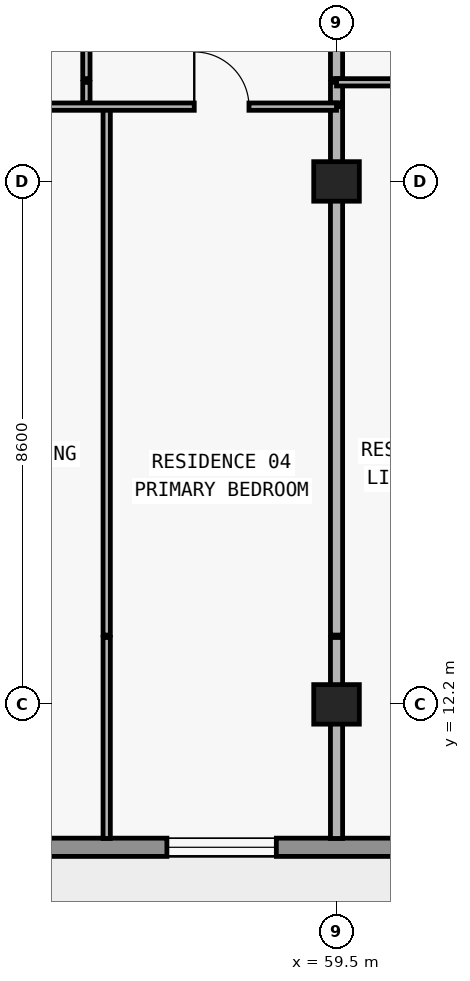
"""IFC4 building model, lengths in metres.
Left out: names, types, materials, properties, quantities, classifications, styles, units other than length and angle.
Written with IfcOpenShell. Run it as: python <this file> out.ifc"""

import sys

from ifc_helpers import new_model, si_unit, direction, frame, frame_2d, origin, origin_2d, place, context, subcontext, project, spatial, rectangle, extrude, element, fill, save


model = new_model("IFC4")
c1 = context("Model", 3, precision=1e-05, world=origin(), true_north=direction((0.0, 1.0)))
c2 = subcontext(c1, "Body", "Model", "MODEL_VIEW")
j1 = project(units=[si_unit("LENGTHUNIT", "METRE"), si_unit("PLANEANGLEUNIT", "RADIAN")], contexts=[c1])
p1 = place(None, origin())
s1 = spatial("IfcSite", under=j1, at=p1, CompositionType="ELEMENT")
p2 = place(p1, origin())
s2 = spatial("IfcBuilding", under=s1, at=p2, CompositionType="ELEMENT")
p3 = place(p2, frame((0.0, 0.0, 246.3)))
s3 = spatial("IfcBuildingStorey", under=s2, at=p3, CompositionType="ELEMENT", Elevation=246.3)
for number, where, z_axis, x_axis in (
    (1, (59.5, 12.2, 0.0), (0.0, 0.0, 1.0), (1.0, 0.0, 0.0)),
    (2, (59.5, 20.8, 0.0), (0.0, 0.0, 1.0), (1.0, 0.0, 0.0)),
):
    element("IfcColumn", number, at=place(p3, frame(where, z_axis=z_axis, x_axis=x_axis)), inside=s3, PredefinedType="COLUMN", context=c2, shape_type="SweptSolid", body=[
        extrude(rectangle(XDim=0.75, YDim=0.65, at=origin_2d()), origin(), (0.0, 0.0, 1.0), 3.05),
    ])
p4 = place(p3, frame((65.7, 9.85, 0.0), z_axis=(0.0, 0.0, 1.0), x_axis=(-1.0, 0.0, 0.0)))
e3 = element("IfcWall", 3, at=p4, inside=s3, PredefinedType="STANDARD", context=c2, shape_type="SweptSolid", body=[
    extrude(rectangle(XDim=53.6, YDim=0.3, at=frame_2d((26.8, 0.0))), origin(), (0.0, 0.0, 1.0), 3.05),
])
p5 = place(p4, frame((48.05, 0.0, 0.85)))
e4 = element("IfcOpeningElement", 4, at=p5, cuts=e3, PredefinedType="OPENING", context=c2, shape_type="SweptSolid", body=[
    extrude(rectangle(XDim=1.8, YDim=1.55, at=frame_2d((0.9, 0.775))), frame((0.0, 0.16, 0.0), z_axis=(0.0, -1.0, 0.0), x_axis=(1.0, 0.0, 0.0)), (0.0, 0.0, 1.0), 0.32),
])
p6 = place(p4, frame((44.09, 0.0, 0.0)))
e5 = element("IfcOpeningElement", 5, at=p6, cuts=e3, PredefinedType="OPENING", context=c2, shape_type="SweptSolid", body=[
    extrude(rectangle(XDim=2.0, YDim=2.3, at=frame_2d((1.0, 1.15))), frame((0.0, 0.16, 0.0), z_axis=(0.0, -1.0, 0.0), x_axis=(1.0, 0.0, 0.0)), (0.0, 0.0, 1.0), 0.32),
])
p7 = place(p4, frame((39.99, 0.0, 0.85)))
e6 = element("IfcOpeningElement", 6, at=p7, cuts=e3, PredefinedType="OPENING", context=c2, shape_type="SweptSolid", body=[
    extrude(rectangle(XDim=1.8, YDim=1.55, at=frame_2d((0.9, 0.775))), frame((0.0, 0.16, 0.0), z_axis=(0.0, -1.0, 0.0), x_axis=(1.0, 0.0, 0.0)), (0.0, 0.0, 1.0), 0.32),
])
p8 = place(p4, frame((36.09, 0.0, 0.0)))
e7 = element("IfcOpeningElement", 7, at=p8, cuts=e3, PredefinedType="OPENING", context=c2, shape_type="SweptSolid", body=[
    extrude(rectangle(XDim=2.0, YDim=2.3, at=frame_2d((1.0, 1.15))), frame((0.0, 0.16, 0.0), z_axis=(0.0, -1.0, 0.0), x_axis=(1.0, 0.0, 0.0)), (0.0, 0.0, 1.0), 0.32),
])
p9 = place(p4, frame((31.41, 0.0, 0.65)))
e8 = element("IfcOpeningElement", 8, at=p9, cuts=e3, PredefinedType="OPENING", context=c2, shape_type="SweptSolid", body=[
    extrude(rectangle(XDim=2.6, YDim=1.85, at=frame_2d((1.3, 0.925))), frame((0.0, 0.16, 0.0), z_axis=(0.0, -1.0, 0.0), x_axis=(1.0, 0.0, 0.0)), (0.0, 0.0, 1.0), 0.32),
])
p10 = place(p4, frame((25.7, 0.0, 0.85)))
e9 = element("IfcOpeningElement", 9, at=p10, cuts=e3, PredefinedType="OPENING", context=c2, shape_type="SweptSolid", body=[
    extrude(rectangle(XDim=2.2, YDim=1.55, at=frame_2d((1.1, 0.775))), frame((0.0, 0.16, 0.0), z_axis=(0.0, -1.0, 0.0), x_axis=(1.0, 0.0, 0.0)), (0.0, 0.0, 1.0), 0.32),
])
p11 = place(p4, frame((17.7, 0.0, 0.85)))
e10 = element("IfcOpeningElement", 10, at=p11, cuts=e3, PredefinedType="OPENING", context=c2, shape_type="SweptSolid", body=[
    extrude(rectangle(XDim=2.2, YDim=1.55, at=frame_2d((1.1, 0.775))), frame((0.0, 0.16, 0.0), z_axis=(0.0, -1.0, 0.0), x_axis=(1.0, 0.0, 0.0)), (0.0, 0.0, 1.0), 0.32),
])
p12 = place(p4, frame((11.29, 0.0, 0.0)))
e11 = element("IfcOpeningElement", 11, at=p12, cuts=e3, PredefinedType="OPENING", context=c2, shape_type="SweptSolid", body=[
    extrude(rectangle(XDim=2.0, YDim=2.3, at=frame_2d((1.0, 1.15))), frame((0.0, 0.16, 0.0), z_axis=(0.0, -1.0, 0.0), x_axis=(1.0, 0.0, 0.0)), (0.0, 0.0, 1.0), 0.32),
])
p13 = place(p4, frame((7.19, 0.0, 0.85)))
e12 = element("IfcOpeningElement", 12, at=p13, cuts=e3, PredefinedType="OPENING", context=c2, shape_type="SweptSolid", body=[
    extrude(rectangle(XDim=1.8, YDim=1.55, at=frame_2d((0.9, 0.775))), frame((0.0, 0.16, 0.0), z_axis=(0.0, -1.0, 0.0), x_axis=(1.0, 0.0, 0.0)), (0.0, 0.0, 1.0), 0.32),
])
p14 = place(p4, frame((0.65, 0.0, 0.85)))
e13 = element("IfcOpeningElement", 13, at=p14, cuts=e3, PredefinedType="OPENING", context=c2, shape_type="SweptSolid", body=[
    extrude(rectangle(XDim=1.8, YDim=1.55, at=frame_2d((0.9, 0.775))), frame((0.0, 0.16, 0.0), z_axis=(0.0, -1.0, 0.0), x_axis=(1.0, 0.0, 0.0)), (0.0, 0.0, 1.0), 0.32),
])
p15 = place(p3, frame((55.386, 22.09, 0.0), z_axis=(0.0, 0.0, 1.0), x_axis=(0.0, 1.0, 0.0)))
e14 = element("IfcWall", 14, at=p15, inside=s3, PredefinedType="PARTITIONING", context=c2, shape_type="SweptSolid", body=[
    extrude(rectangle(XDim=0.34, YDim=0.12, at=frame_2d((0.17, 0.0))), origin(), (0.0, 0.0, 1.0), 2.578),
])
p16 = place(p3, frame((55.386, 22.49, 0.0), z_axis=(0.0, 0.0, 1.0), x_axis=(0.0, 1.0, 0.0)))
e15 = element("IfcWall", 15, at=p16, inside=s3, PredefinedType="PARTITIONING", context=c2, shape_type="SweptSolid", body=[
    extrude(rectangle(XDim=4.69, YDim=0.12, at=frame_2d((2.345, 0.0))), origin(), (0.0, 0.0, 1.0), 2.578),
])
p17 = place(p16, frame((1.895, 0.0, 0.0)))
e16 = element("IfcOpeningElement", 16, at=p17, cuts=e15, PredefinedType="OPENING", context=c2, shape_type="SweptSolid", body=[
    extrude(rectangle(XDim=0.9, YDim=2.15, at=frame_2d((0.45, 1.075))), frame((0.0, 0.07, 0.0), z_axis=(0.0, -1.0, 0.0), x_axis=(1.0, 0.0, 0.0)), (0.0, 0.0, 1.0), 0.14),
])
p18 = place(p3, frame((55.72, 9.995, 0.0), z_axis=(0.0, 0.0, 1.0), x_axis=(0.0, 1.0, 0.0)))
e17 = element("IfcWall", 17, at=p18, inside=s3, PredefinedType="PARTITIONING", context=c2, shape_type="SweptSolid", body=[
    extrude(rectangle(XDim=3.305, YDim=0.12, at=frame_2d((1.652, 0.0))), origin(), (0.0, 0.0, 1.0), 3.05),
])
p19 = place(p3, frame((55.72, 13.34, 0.0), z_axis=(0.0, 0.0, 1.0), x_axis=(0.0, 1.0, 0.0)))
e18 = element("IfcWall", 18, at=p19, inside=s3, PredefinedType="PARTITIONING", context=c2, shape_type="SweptSolid", body=[
    extrude(rectangle(XDim=8.69, YDim=0.12, at=frame_2d((4.345, 0.0))), origin(), (0.0, 0.0, 1.0), 3.05),
])
p20 = place(p3, frame((59.5, 9.995, 0.0), z_axis=(0.0, 0.0, 1.0), x_axis=(0.0, 1.0, 0.0)))
e19 = element("IfcWall", 19, at=p20, inside=s3, PredefinedType="PARTITIONING", context=c2, shape_type="SweptSolid", body=[
    extrude(rectangle(XDim=3.305, YDim=0.2, at=frame_2d((1.652, 0.0))), origin(), (0.0, 0.0, 1.0), 2.263),
])
p21 = place(p3, frame((59.5, 13.34, 0.0), z_axis=(0.0, 0.0, 1.0), x_axis=(0.0, 1.0, 0.0)))
e20 = element("IfcWall", 20, at=p21, inside=s3, PredefinedType="PARTITIONING", context=c2, shape_type="SweptSolid", body=[
    extrude(rectangle(XDim=8.69, YDim=0.2, at=frame_2d((4.345, 0.0))), origin(), (0.0, 0.0, 1.0), 2.263),
])
p22 = place(p3, frame((59.5, 22.09, 0.0), z_axis=(0.0, 0.0, 1.0), x_axis=(0.0, 1.0, 0.0)))
e21 = element("IfcWall", 21, at=p22, inside=s3, PredefinedType="PARTITIONING", context=c2, shape_type="SweptSolid", body=[
    extrude(rectangle(XDim=0.34, YDim=0.2, at=frame_2d((0.17, 0.0))), origin(), (0.0, 0.0, 1.0), 2.263),
])
p23 = place(p3, frame((59.5, 22.49, 0.0), z_axis=(0.0, 0.0, 1.0), x_axis=(0.0, 1.0, 0.0)))
e22 = element("IfcWall", 22, at=p23, inside=s3, PredefinedType="PARTITIONING", context=c2, shape_type="SweptSolid", body=[
    extrude(rectangle(XDim=4.69, YDim=0.2, at=frame_2d((2.345, 0.0))), origin(), (0.0, 0.0, 1.0), 2.263),
])
p24 = place(p3, frame((51.32, 22.03, 0.0), z_axis=(0.0, 0.0, 1.0), x_axis=(1.0, 0.0, 0.0)))
e23 = element("IfcWall", 23, at=p24, inside=s3, PredefinedType="PARTITIONING", context=c2, shape_type="SweptSolid", body=[
    extrude(rectangle(XDim=8.18, YDim=0.12, at=frame_2d((4.09, 0.0))), origin(), (0.0, 0.0, 1.0), 3.05),
])
p25 = place(p24, frame((1.583, 0.0, 0.0)))
e24 = element("IfcOpeningElement", 24, at=p25, cuts=e23, PredefinedType="OPENING", context=c2, shape_type="SweptSolid", body=[
    extrude(rectangle(XDim=0.9, YDim=2.15, at=frame_2d((0.45, 1.075))), frame((0.0, 0.07, 0.0), z_axis=(0.0, -1.0, 0.0), x_axis=(1.0, 0.0, 0.0)), (0.0, 0.0, 1.0), 0.14),
])
p26 = place(p24, frame((5.84, 0.0, 0.0)))
e25 = element("IfcOpeningElement", 25, at=p26, cuts=e23, PredefinedType="OPENING", context=c2, shape_type="SweptSolid", body=[
    extrude(rectangle(XDim=0.9, YDim=2.15, at=frame_2d((0.45, 1.075))), frame((0.0, 0.07, 0.0), z_axis=(0.0, -1.0, 0.0), x_axis=(1.0, 0.0, 0.0)), (0.0, 0.0, 1.0), 0.14),
])
p27 = place(p3, frame((59.5, 22.43, 0.0), z_axis=(0.0, 0.0, 1.0), x_axis=(1.0, 0.0, 0.0)))
e26 = element("IfcWall", 26, at=p27, inside=s3, PredefinedType="PARTITIONING", context=c2, shape_type="SweptSolid", body=[
    extrude(rectangle(XDim=6.2, YDim=0.12, at=frame_2d((3.1, 0.0))), origin(), (0.0, 0.0, 1.0), 3.05),
])
p28 = place(p27, frame((1.1, 0.0, 0.0)))
e27 = element("IfcOpeningElement", 27, at=p28, cuts=e26, PredefinedType="OPENING", context=c2, shape_type="SweptSolid", body=[
    extrude(rectangle(XDim=0.9, YDim=2.15, at=frame_2d((0.45, 1.075))), frame((0.0, 0.07, 0.0), z_axis=(0.0, -1.0, 0.0), x_axis=(1.0, 0.0, 0.0)), (0.0, 0.0, 1.0), 0.14),
])
p29 = place(p27, frame((4.2, 0.0, 0.0)))
e28 = element("IfcOpeningElement", 28, at=p29, cuts=e26, PredefinedType="OPENING", context=c2, shape_type="SweptSolid", body=[
    extrude(rectangle(XDim=0.9, YDim=2.15, at=frame_2d((0.45, 1.075))), frame((0.0, 0.07, 0.0), z_axis=(0.0, -1.0, 0.0), x_axis=(1.0, 0.0, 0.0)), (0.0, 0.0, 1.0), 0.14),
])
p30 = place(p13, origin())
e29 = element("IfcWindow", 29, at=p30, inside=s3, PartitioningType="SINGLE_PANEL", PredefinedType="WINDOW", context=c2, shape_type="SweptSolid", body=[
    extrude(rectangle(XDim=1.8, YDim=1.55, at=frame_2d((0.9, 0.775))), frame((0.0, 0.03, 0.0), z_axis=(0.0, -1.0, 0.0), x_axis=(1.0, 0.0, 0.0)), (0.0, 0.0, 1.0), 0.06),
])
fill(e12, e29)
p31 = place(p26, origin())
e30 = element("IfcDoor", 30, at=p31, inside=s3, OperationType="SINGLE_SWING_LEFT", PredefinedType="DOOR", context=c2, shape_type="SweptSolid", body=[
    extrude(rectangle(XDim=0.9, YDim=2.15, at=frame_2d((0.45, 1.075))), frame((0.0, 0.025, 0.0), z_axis=(0.0, -1.0, 0.0), x_axis=(1.0, 0.0, 0.0)), (0.0, 0.0, 1.0), 0.05),
])
fill(e25, e30)
save(model, sys.argv[1])
